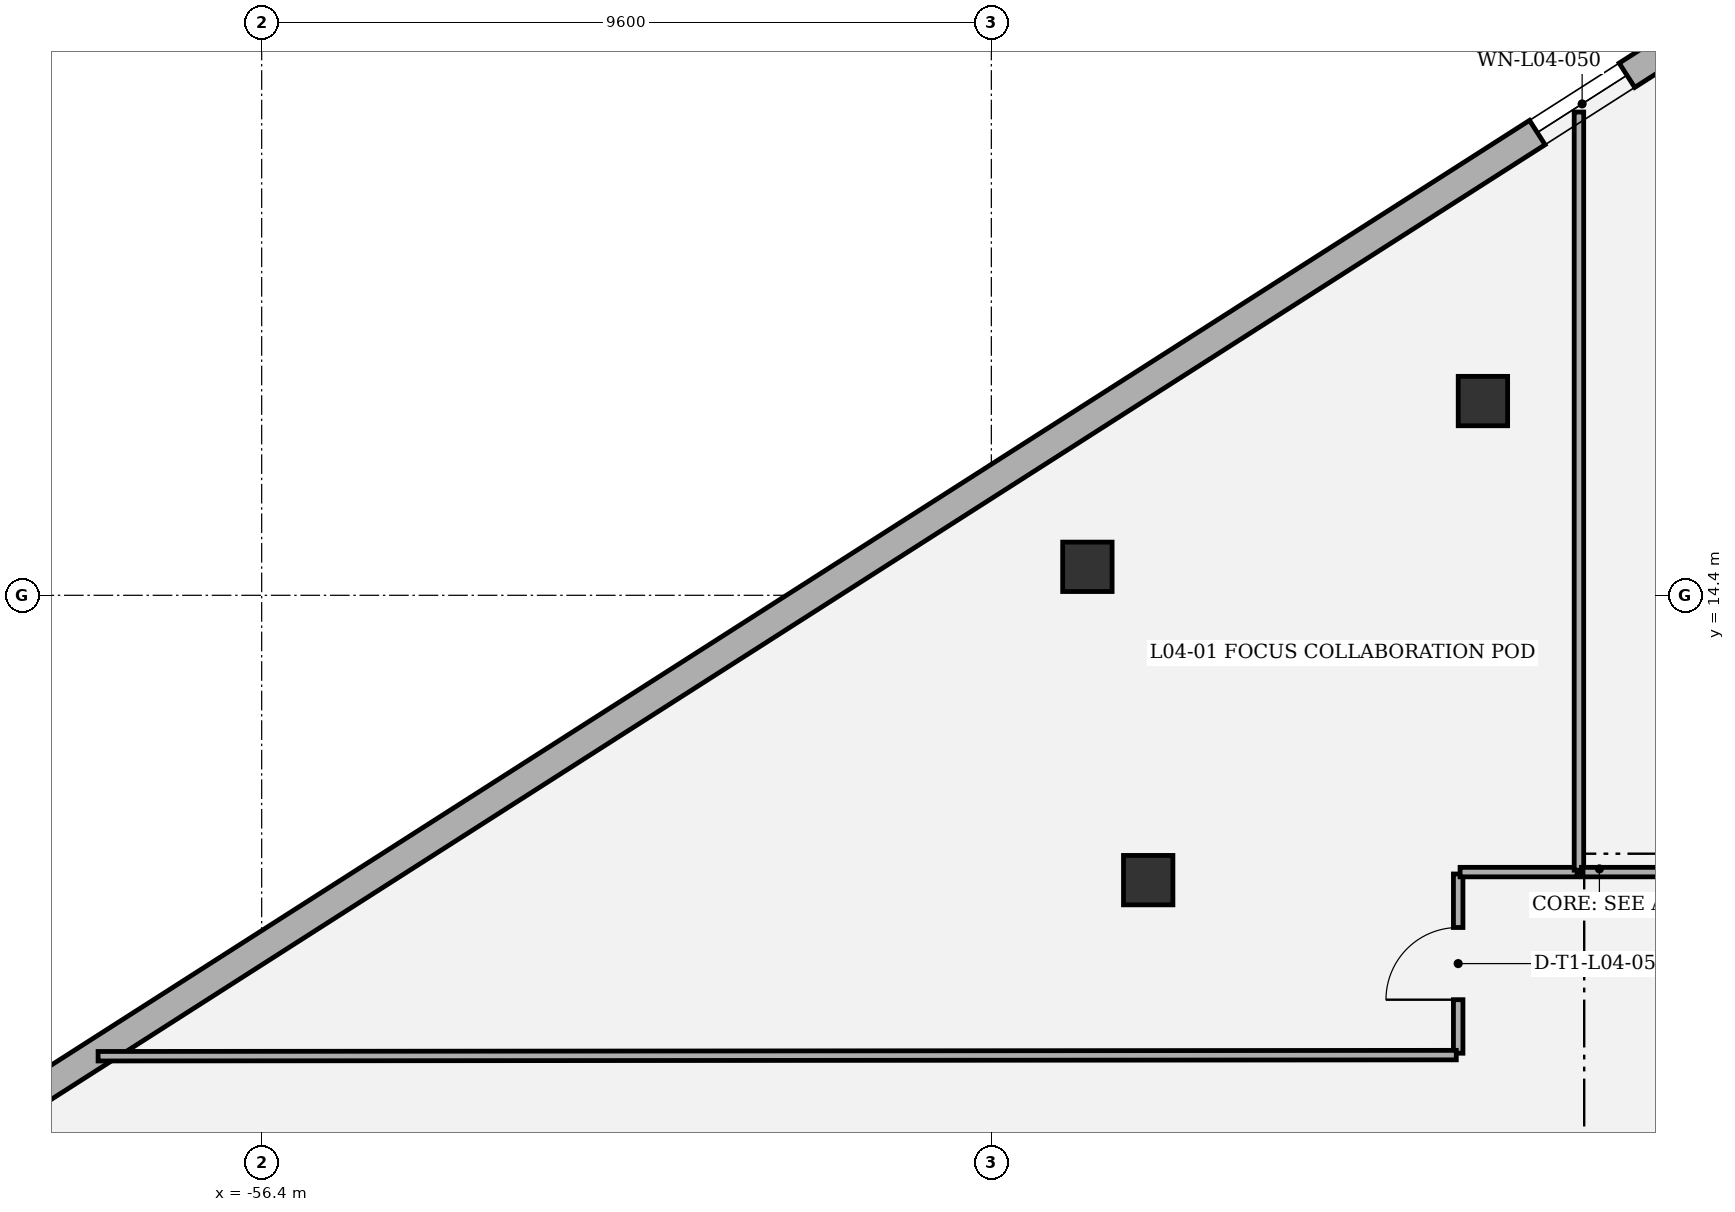
"""IFC4 building model, lengths in metres.
Left out: names, types, materials, properties, quantities, classifications, styles, units other than length and angle.
Written with IfcOpenShell. Run it as: python <this file> out.ifc"""

import sys

from ifc_helpers import new_model, si_unit, direction, frame, frame_2d, origin, origin_2d, place, context, subcontext, project, spatial, rectangle, extrude, element, fill, save


model = new_model("IFC4")
c1 = context("Model", 3, precision=1e-05, world=origin(), true_north=direction((0.0, 1.0)))
c2 = subcontext(c1, "Body", "Model", "MODEL_VIEW")
j1 = project(units=[si_unit("LENGTHUNIT", "METRE"), si_unit("PLANEANGLEUNIT", "RADIAN")], contexts=[c1])
p1 = place(None, origin())
s1 = spatial("IfcSite", under=j1, at=p1, CompositionType="ELEMENT")
p2 = place(p1, origin())
s2 = spatial("IfcBuilding", under=s1, at=p2, CompositionType="ELEMENT")
p3 = place(p2, frame((0.0, 0.0, 22.0)))
s3 = spatial("IfcBuildingStorey", under=s2, at=p3, CompositionType="ELEMENT", Elevation=22.0)
for number, where, z_axis, x_axis in (
    (1, (-45.536, 14.775, 0.0), (0.0, 0.0, 1.0), (1.0, 0.0, 0.0)),
    (2, (-40.333, 16.956, 0.0), (0.0, 0.0, 1.0), (1.0, 0.0, 0.0)),
    (3, (-44.736, 10.652, 0.0), (0.0, 0.0, 1.0), (1.0, 0.0, 0.0)),
):
    element("IfcColumn", number, at=place(p3, frame(where, z_axis=z_axis, x_axis=x_axis)), inside=s3, PredefinedType="COLUMN", context=c2, shape_type="SweptSolid", body=[
        extrude(rectangle(XDim=0.65, YDim=0.65, at=origin_2d()), origin(), (0.0, 0.0, 1.0), 5.0),
    ])
p4 = place(p3, frame((-64.419, 4.637, 0.0), z_axis=(0.0, 0.0, 1.0), x_axis=(0.842602364841, 0.538536214905, 0.0)))
e4 = element("IfcWall", 4, at=p4, inside=s3, PredefinedType="SOLIDWALL", context=c2, shape_type="SweptSolid", body=[
    extrude(rectangle(XDim=60.27, YDim=0.38, at=frame_2d((30.135, 0.0))), origin(), (0.0, 0.0, 1.0), 4.58),
])
p5 = place(p4, frame((29.435, 0.0, 0.8)))
e5 = element("IfcOpeningElement", 5, at=p5, cuts=e4, PredefinedType="OPENING", context=c2, shape_type="SweptSolid", body=[
    extrude(rectangle(XDim=1.4, YDim=1.5, at=frame_2d((0.7, 0.75))), frame((0.0, 0.2, 0.0), z_axis=(0.0, -1.0, 0.0), x_axis=(1.0, 0.0, 0.0)), (0.0, 0.0, 1.0), 0.4),
])
p6 = place(p3, frame((-40.658, 8.375, 0.0), z_axis=(0.0, 0.0, 1.0), x_axis=(0.0, 1.0, 0.0)))
e6 = element("IfcWall", 6, at=p6, inside=s3, PredefinedType="PARTITIONING", context=c2, shape_type="SweptSolid", body=[
    extrude(rectangle(XDim=2.358, YDim=0.125, at=frame_2d((1.179, 0.0))), origin(), (0.0, 0.0, 1.0), 4.58),
])
p7 = place(p6, frame((0.704, 0.0, 0.0)))
e7 = element("IfcOpeningElement", 7, at=p7, cuts=e6, PredefinedType="OPENING", context=c2, shape_type="SweptSolid", body=[
    extrude(rectangle(XDim=0.95, YDim=2.15, at=frame_2d((0.475, 1.075))), frame((0.0, 0.073, 0.0), z_axis=(0.0, -1.0, 0.0), x_axis=(1.0, 0.0, 0.0)), (0.0, 0.0, 1.0), 0.145),
])
p8 = place(p3, frame((-40.633, 10.758, 0.0), z_axis=(0.0, 0.0, 1.0), x_axis=(1.0, 0.0, 0.0)))
e8 = element("IfcWall", 8, at=p8, inside=s3, PredefinedType="PARTITIONING", context=c2, shape_type="SweptSolid", body=[
    extrude(rectangle(XDim=1.539, YDim=0.125, at=frame_2d((0.77, 0.0))), origin(), (0.0, 0.0, 1.0), 4.58),
])
p9 = place(p3, frame((-39.069, 10.783, 0.0), z_axis=(0.0, 0.0, 1.0), x_axis=(0.0, 1.0, 0.0)))
e9 = element("IfcWall", 9, at=p9, inside=s3, PredefinedType="PARTITIONING", context=c2, shape_type="SweptSolid", body=[
    extrude(rectangle(XDim=9.976, YDim=0.125, at=frame_2d((4.988, 0.0))), origin(), (0.0, 0.0, 1.0), 4.58),
])
p10 = place(p3, frame((-58.552, 8.335, 0.0), z_axis=(0.0, 0.0, 1.0), x_axis=(0.999999663996, 0.000819761447, 0.0)))
e10 = element("IfcWall", 10, at=p10, inside=s3, PredefinedType="PARTITIONING", context=c2, shape_type="SweptSolid", body=[
    extrude(rectangle(XDim=17.869, YDim=0.125, at=frame_2d((8.935, 0.0))), origin(), (0.0, 0.0, 1.0), 3.55),
])
p11 = place(p3, frame((-39.036, 10.758, 0.0), z_axis=(0.0, 0.0, 1.0), x_axis=(1.0, 0.0, 0.0)))
e11 = element("IfcWall", 11, at=p11, inside=s3, PredefinedType="PARTITIONING", context=c2, shape_type="SweptSolid", body=[
    extrude(rectangle(XDim=10.03, YDim=0.125, at=frame_2d((5.015, 0.0))), origin(), (0.0, 0.0, 1.0), 2.25),
])
p12 = place(p11, frame((4.54, 0.0, 0.0)))
e12 = element("IfcOpeningElement", 12, at=p12, cuts=e11, PredefinedType="OPENING", context=c2, shape_type="SweptSolid", body=[
    extrude(rectangle(XDim=0.95, YDim=2.15, at=frame_2d((0.475, 1.075))), frame((0.0, 0.073, 0.0), z_axis=(0.0, -1.0, 0.0), x_axis=(1.0, 0.0, 0.0)), (0.0, 0.0, 1.0), 0.145),
])
p13 = place(p5, origin())
e13 = element("IfcWindow", 13, at=p13, inside=s3, PartitioningType="SINGLE_PANEL", PredefinedType="WINDOW", context=c2, shape_type="SweptSolid", body=[
    extrude(rectangle(XDim=1.4, YDim=1.5, at=frame_2d((0.7, 0.75))), frame((0.0, 0.03, 0.0), z_axis=(0.0, -1.0, 0.0), x_axis=(1.0, 0.0, 0.0)), (0.0, 0.0, 1.0), 0.06),
])
fill(e5, e13)
p14 = place(p7, origin())
e14 = element("IfcDoor", 14, at=p14, inside=s3, OperationType="SINGLE_SWING_LEFT", PredefinedType="DOOR", context=c2, shape_type="SweptSolid", body=[
    extrude(rectangle(XDim=0.95, YDim=2.15, at=frame_2d((0.475, 1.075))), frame((0.0, 0.025, 0.0), z_axis=(0.0, -1.0, 0.0), x_axis=(1.0, 0.0, 0.0)), (0.0, 0.0, 1.0), 0.05),
])
fill(e7, e14)
save(model, sys.argv[1])
